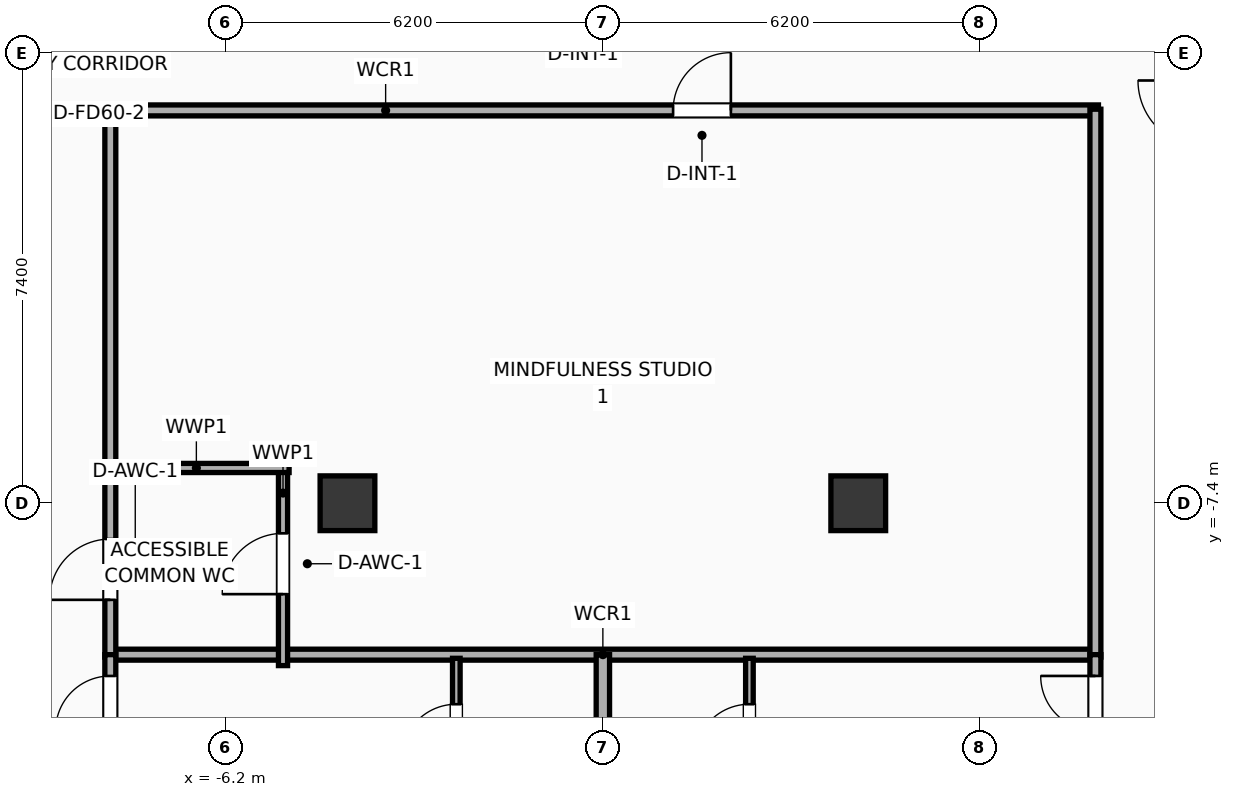
"""IFC4 building model, lengths in metres.
Left out: names, types, materials, properties, quantities, classifications, styles, units other than length and angle.
Written with IfcOpenShell. Run it as: python <this file> out.ifc"""

import sys

from ifc_helpers import new_model, si_unit, direction, frame, frame_2d, origin, origin_2d, place, context, subcontext, project, spatial, rectangle, extrude, element, fill, save


model = new_model("IFC4")
c1 = context("Model", 3, precision=1e-05, world=origin(), true_north=direction((0.0, 1.0)))
c2 = subcontext(c1, "Body", "Model", "MODEL_VIEW")
j1 = project(units=[si_unit("LENGTHUNIT", "METRE"), si_unit("PLANEANGLEUNIT", "RADIAN")], contexts=[c1])
p1 = place(None, origin())
s1 = spatial("IfcSite", under=j1, at=p1, CompositionType="ELEMENT")
p2 = place(p1, origin())
s2 = spatial("IfcBuilding", under=s1, at=p2, CompositionType="ELEMENT")
p3 = place(p2, frame((0.0, 0.0, 152.1)))
s3 = spatial("IfcBuildingStorey", under=s2, at=p3, CompositionType="ELEMENT", Elevation=152.1)
for number, where, z_axis, x_axis in (
    (1, (-4.2, -7.4, 0.0), (0.0, 0.0, 1.0), (1.0, 0.0, 0.0)),
    (2, (4.2, -7.4, 0.0), (0.0, 0.0, 1.0), (1.0, 0.0, 0.0)),
):
    element("IfcColumn", number, at=place(p3, frame(where, z_axis=z_axis, x_axis=x_axis)), inside=s3, PredefinedType="COLUMN", context=c2, shape_type="SweptSolid", body=[
        extrude(rectangle(XDim=0.9, YDim=0.9, at=origin_2d()), origin(), (0.0, 0.0, 1.0), 3.9),
    ])
p4 = place(p3, frame((-8.15, -9.89, 0.0), z_axis=(0.0, 0.0, 1.0), x_axis=(1.0, 0.0, 0.0)))
e3 = element("IfcWall", 3, at=p4, inside=s3, PredefinedType="PARTITIONING", context=c2, shape_type="SweptSolid", body=[
    extrude(rectangle(XDim=16.3, YDim=0.18, at=frame_2d((8.15, 0.0))), origin(), (0.0, 0.0, 1.0), 3.65),
])
p5 = place(p3, frame((-8.15, -0.94, 0.0), z_axis=(0.0, 0.0, 1.0), x_axis=(1.0, 0.0, 0.0)))
e4 = element("IfcWall", 4, at=p5, inside=s3, PredefinedType="PARTITIONING", context=c2, shape_type="SweptSolid", body=[
    extrude(rectangle(XDim=16.3, YDim=0.18, at=frame_2d((8.15, 0.0))), origin(), (0.0, 0.0, 1.0), 3.65),
])
p6 = place(p5, frame((9.305, 0.0, 0.0)))
e5 = element("IfcOpeningElement", 5, at=p6, cuts=e4, PredefinedType="OPENING", context=c2, shape_type="SweptSolid", body=[
    extrude(rectangle(XDim=0.95, YDim=2.05, at=frame_2d((0.475, 1.025))), frame((0.0, 0.1, 0.0), z_axis=(0.0, -1.0, 0.0), x_axis=(1.0, 0.0, 0.0)), (0.0, 0.0, 1.0), 0.2),
])
p7 = place(p3, frame((-8.1, -9.93, 0.0), z_axis=(0.0, 0.0, 1.0), x_axis=(0.0, 1.0, 0.0)))
e6 = element("IfcWall", 6, at=p7, inside=s3, PredefinedType="PARTITIONING", context=c2, shape_type="SweptSolid", body=[
    extrude(rectangle(XDim=9.01, YDim=0.18, at=frame_2d((4.505, 0.0))), origin(), (0.0, 0.0, 1.0), 3.65),
])
p8 = place(p7, frame((0.942, 0.0, 0.0)))
e7 = element("IfcOpeningElement", 7, at=p8, cuts=e6, PredefinedType="OPENING", context=c2, shape_type="SweptSolid", body=[
    extrude(rectangle(XDim=1.0, YDim=2.05, at=frame_2d((0.5, 1.025))), frame((0.0, 0.1, 0.0), z_axis=(0.0, -1.0, 0.0), x_axis=(1.0, 0.0, 0.0)), (0.0, 0.0, 1.0), 0.2),
])
p9 = place(p3, frame((8.1, -9.93, 0.0), z_axis=(0.0, 0.0, 1.0), x_axis=(0.0, 1.0, 0.0)))
e8 = element("IfcWall", 8, at=p9, inside=s3, PredefinedType="PARTITIONING", context=c2, shape_type="SweptSolid", body=[
    extrude(rectangle(XDim=9.01, YDim=0.18, at=frame_2d((4.505, 0.0))), origin(), (0.0, 0.0, 1.0), 3.65),
])
p10 = place(p3, frame((-5.26, -10.07, 0.0), z_axis=(0.0, 0.0, 1.0), x_axis=(0.0, 1.0, 0.0)))
e9 = element("IfcWall", 9, at=p10, inside=s3, PredefinedType="PLUMBINGWALL", context=c2, shape_type="SweptSolid", body=[
    extrude(rectangle(XDim=3.35, YDim=0.15, at=frame_2d((1.675, 0.0))), origin(), (0.0, 0.0, 1.0), 3.65),
])
p11 = place(p10, frame((1.175, 0.0, 0.0)))
e10 = element("IfcOpeningElement", 10, at=p11, cuts=e9, PredefinedType="OPENING", context=c2, shape_type="SweptSolid", body=[
    extrude(rectangle(XDim=1.0, YDim=2.05, at=frame_2d((0.5, 1.025))), frame((0.0, 0.085, 0.0), z_axis=(0.0, -1.0, 0.0), x_axis=(1.0, 0.0, 0.0)), (0.0, 0.0, 1.0), 0.17),
])
p12 = place(p3, frame((-8.21, -6.82, 0.0), z_axis=(0.0, 0.0, 1.0), x_axis=(1.0, 0.0, 0.0)))
e11 = element("IfcWall", 11, at=p12, inside=s3, PredefinedType="PLUMBINGWALL", context=c2, shape_type="SweptSolid", body=[
    extrude(rectangle(XDim=3.05, YDim=0.15, at=frame_2d((1.525, 0.0))), origin(), (0.0, 0.0, 1.0), 3.65),
])
p13 = place(p3, frame((-2.41, -12.36, 0.0), z_axis=(0.0, 0.0, 1.0), x_axis=(0.0, 1.0, 0.0)))
e12 = element("IfcWall", 12, at=p13, inside=s3, PredefinedType="PARTITIONING", context=c2, shape_type="SweptSolid", body=[
    extrude(rectangle(XDim=2.41, YDim=0.125, at=frame_2d((1.205, 0.0))), origin(), (0.0, 0.0, 1.0), 3.65),
])
p14 = place(p13, frame((0.755, 0.0, 0.0)))
e13 = element("IfcOpeningElement", 13, at=p14, cuts=e12, PredefinedType="OPENING", context=c2, shape_type="SweptSolid", body=[
    extrude(rectangle(XDim=0.9, YDim=2.05, at=frame_2d((0.45, 1.025))), frame((0.0, 0.073, 0.0), z_axis=(0.0, -1.0, 0.0), x_axis=(1.0, 0.0, 0.0)), (0.0, 0.0, 1.0), 0.145),
])
p15 = place(p3, frame((-8.1, -21.456, 0.0), z_axis=(0.0, 0.0, 1.0), x_axis=(0.0, 1.0, 0.0)))
e14 = element("IfcWall", 14, at=p15, inside=s3, PredefinedType="PARTITIONING", context=c2, shape_type="SweptSolid", body=[
    extrude(rectangle(XDim=11.566, YDim=0.18, at=frame_2d((5.783, 0.0))), origin(), (0.0, 0.0, 1.0), 3.65),
])
p16 = place(p15, frame((10.316, 0.0, 0.0)))
e15 = element("IfcOpeningElement", 15, at=p16, cuts=e14, PredefinedType="OPENING", context=c2, shape_type="SweptSolid", body=[
    extrude(rectangle(XDim=0.9, YDim=2.05, at=frame_2d((0.45, 1.025))), frame((0.0, 0.1, 0.0), z_axis=(0.0, -1.0, 0.0), x_axis=(1.0, 0.0, 0.0)), (0.0, 0.0, 1.0), 0.2),
])
p17 = place(p3, frame((2.41, -12.36, 0.0), z_axis=(0.0, 0.0, 1.0), x_axis=(0.0, 1.0, 0.0)))
e16 = element("IfcWall", 16, at=p17, inside=s3, PredefinedType="PARTITIONING", context=c2, shape_type="SweptSolid", body=[
    extrude(rectangle(XDim=2.41, YDim=0.125, at=frame_2d((1.205, 0.0))), origin(), (0.0, 0.0, 1.0), 3.65),
])
p18 = place(p17, frame((0.755, 0.0, 0.0)))
e17 = element("IfcOpeningElement", 17, at=p18, cuts=e16, PredefinedType="OPENING", context=c2, shape_type="SweptSolid", body=[
    extrude(rectangle(XDim=0.9, YDim=2.05, at=frame_2d((0.45, 1.025))), frame((0.0, 0.073, 0.0), z_axis=(0.0, -1.0, 0.0), x_axis=(1.0, 0.0, 0.0)), (0.0, 0.0, 1.0), 0.145),
])
p19 = place(p3, frame((8.1, -19.754, 0.0), z_axis=(0.0, 0.0, 1.0), x_axis=(0.0, 1.0, 0.0)))
e18 = element("IfcWall", 18, at=p19, inside=s3, PredefinedType="PARTITIONING", context=c2, shape_type="SweptSolid", body=[
    extrude(rectangle(XDim=9.864, YDim=0.18, at=frame_2d((4.932, 0.0))), origin(), (0.0, 0.0, 1.0), 3.65),
])
p20 = place(p19, frame((8.614, 0.0, 0.0)))
e19 = element("IfcOpeningElement", 19, at=p20, cuts=e18, PredefinedType="OPENING", context=c2, shape_type="SweptSolid", body=[
    extrude(rectangle(XDim=0.9, YDim=2.05, at=frame_2d((0.45, 1.025))), frame((0.0, 0.1, 0.0), z_axis=(0.0, -1.0, 0.0), x_axis=(1.0, 0.0, 0.0)), (0.0, 0.0, 1.0), 0.2),
])
p21 = place(p3, frame((0.0, -20.605, 0.0), z_axis=(0.0, 0.0, 1.0), x_axis=(0.0, 1.0, 0.0)))
e20 = element("IfcWall", 20, at=p21, inside=s3, PredefinedType="PARTITIONING", context=c2, shape_type="SweptSolid", body=[
    extrude(rectangle(XDim=10.715, YDim=0.22, at=frame_2d((5.357, 0.0))), origin(), (0.0, 0.0, 1.0), 3.65),
])
p22 = place(p6, origin())
e21 = element("IfcDoor", 21, at=p22, inside=s3, OperationType="SINGLE_SWING_RIGHT", PredefinedType="DOOR", context=c2, shape_type="SweptSolid", body=[
    extrude(rectangle(XDim=0.95, YDim=2.05, at=frame_2d((0.475, 1.025))), frame((0.0, 0.025, 0.0), z_axis=(0.0, -1.0, 0.0), x_axis=(1.0, 0.0, 0.0)), (0.0, 0.0, 1.0), 0.05),
])
fill(e5, e21)
p23 = place(p8, origin())
e22 = element("IfcDoor", 22, at=p23, inside=s3, OperationType="SINGLE_SWING_LEFT", PredefinedType="DOOR", context=c2, shape_type="SweptSolid", body=[
    extrude(rectangle(XDim=1.0, YDim=2.05, at=frame_2d((0.5, 1.025))), frame((0.0, 0.025, 0.0), z_axis=(0.0, -1.0, 0.0), x_axis=(1.0, 0.0, 0.0)), (0.0, 0.0, 1.0), 0.05),
])
fill(e7, e22)
p24 = place(p11, origin())
e23 = element("IfcDoor", 23, at=p24, inside=s3, OperationType="SINGLE_SWING_LEFT", PredefinedType="DOOR", context=c2, shape_type="SweptSolid", body=[
    extrude(rectangle(XDim=1.0, YDim=2.05, at=frame_2d((0.5, 1.025))), frame((0.0, 0.025, 0.0), z_axis=(0.0, -1.0, 0.0), x_axis=(1.0, 0.0, 0.0)), (0.0, 0.0, 1.0), 0.05),
])
fill(e10, e23)
p25 = place(p14, origin())
e24 = element("IfcDoor", 24, at=p25, inside=s3, OperationType="SINGLE_SWING_LEFT", PredefinedType="DOOR", context=c2, shape_type="SweptSolid", body=[
    extrude(rectangle(XDim=0.9, YDim=2.05, at=frame_2d((0.45, 1.025))), frame((0.0, 0.025, 0.0), z_axis=(0.0, -1.0, 0.0), x_axis=(1.0, 0.0, 0.0)), (0.0, 0.0, 1.0), 0.05),
])
fill(e13, e24)
p26 = place(p16, origin())
e25 = element("IfcDoor", 25, at=p26, inside=s3, OperationType="SINGLE_SWING_LEFT", PredefinedType="DOOR", context=c2, shape_type="SweptSolid", body=[
    extrude(rectangle(XDim=0.9, YDim=2.05, at=frame_2d((0.45, 1.025))), frame((0.0, 0.025, 0.0), z_axis=(0.0, -1.0, 0.0), x_axis=(1.0, 0.0, 0.0)), (0.0, 0.0, 1.0), 0.05),
])
fill(e15, e25)
p27 = place(p18, origin())
e26 = element("IfcDoor", 26, at=p27, inside=s3, OperationType="SINGLE_SWING_LEFT", PredefinedType="DOOR", context=c2, shape_type="SweptSolid", body=[
    extrude(rectangle(XDim=0.9, YDim=2.05, at=frame_2d((0.45, 1.025))), frame((0.0, 0.025, 0.0), z_axis=(0.0, -1.0, 0.0), x_axis=(1.0, 0.0, 0.0)), (0.0, 0.0, 1.0), 0.05),
])
fill(e17, e26)
p28 = place(p20, origin())
e27 = element("IfcDoor", 27, at=p28, inside=s3, OperationType="SINGLE_SWING_RIGHT", PredefinedType="DOOR", context=c2, shape_type="SweptSolid", body=[
    extrude(rectangle(XDim=0.9, YDim=2.05, at=frame_2d((0.45, 1.025))), frame((0.0, 0.025, 0.0), z_axis=(0.0, -1.0, 0.0), x_axis=(1.0, 0.0, 0.0)), (0.0, 0.0, 1.0), 0.05),
])
fill(e19, e27)
save(model, sys.argv[1])
